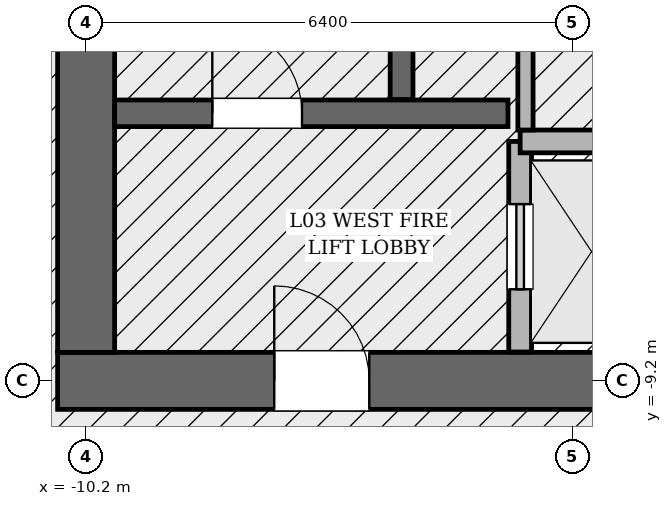
"""IFC4 building model, lengths in metres.
Left out: names, types, materials, properties, quantities, classifications, styles, units other than length and angle.
Written with IfcOpenShell. Run it as: python <this file> out.ifc"""

import sys

from ifc_helpers import new_model, si_unit, direction, frame, frame_2d, origin, place, context, subcontext, project, spatial, rectangle, extrude, element, fill, save


model = new_model("IFC4")
c1 = context("Model", 3, precision=1e-05, world=origin(), true_north=direction((0.0, 1.0)))
c2 = subcontext(c1, "Body", "Model", "MODEL_VIEW")
j1 = project(units=[si_unit("LENGTHUNIT", "METRE"), si_unit("PLANEANGLEUNIT", "RADIAN")], contexts=[c1])
p1 = place(None, origin())
s1 = spatial("IfcSite", under=j1, at=p1, CompositionType="ELEMENT")
p2 = place(p1, origin())
s2 = spatial("IfcBuilding", under=s1, at=p2, CompositionType="ELEMENT")
p3 = place(p2, frame((0.0, 0.0, 16.8)))
s3 = spatial("IfcBuildingStorey", under=s2, at=p3, CompositionType="ELEMENT", Elevation=16.8)
p4 = place(p3, frame((10.575, -9.2, 0.0), z_axis=(0.0, 0.0, 1.0), x_axis=(-1.0, 0.0, 0.0)))
e1 = element("IfcWall", 1, at=p4, inside=s3, PredefinedType="SHEAR", context=c2, shape_type="SweptSolid", body=[
    extrude(rectangle(XDim=21.15, YDim=0.75, at=frame_2d((10.575, 0.0))), origin(), (0.0, 0.0, 1.0), 5.4),
])
p5 = place(p4, frame((2.85, 0.0, 0.0)))
e2 = element("IfcOpeningElement", 2, at=p5, cuts=e1, PredefinedType="OPENING", context=c2, shape_type="SweptSolid", body=[
    extrude(rectangle(XDim=1.25, YDim=2.25, at=frame_2d((0.625, 1.125))), frame((0.0, 0.385, 0.0), z_axis=(0.0, -1.0, 0.0), x_axis=(1.0, 0.0, 0.0)), (0.0, 0.0, 1.0), 0.77),
])
p6 = place(p4, frame((17.05, 0.0, 0.0)))
e3 = element("IfcOpeningElement", 3, at=p6, cuts=e1, PredefinedType="OPENING", context=c2, shape_type="SweptSolid", body=[
    extrude(rectangle(XDim=1.25, YDim=2.25, at=frame_2d((0.625, 1.125))), frame((0.0, 0.385, 0.0), z_axis=(0.0, -1.0, 0.0), x_axis=(1.0, 0.0, 0.0)), (0.0, 0.0, 1.0), 0.77),
])
p7 = place(p3, frame((-10.2, -8.825, 0.0), z_axis=(0.0, 0.0, 1.0), x_axis=(0.0, 1.0, 0.0)))
e4 = element("IfcWall", 4, at=p7, inside=s3, PredefinedType="SHEAR", context=c2, shape_type="SweptSolid", body=[
    extrude(rectangle(XDim=17.65, YDim=0.75, at=frame_2d((8.825, 0.0))), origin(), (0.0, 0.0, 1.0), 5.4),
])
p8 = place(p7, frame((12.615, 0.0, 0.0)))
e5 = element("IfcOpeningElement", 5, at=p8, cuts=e4, PredefinedType="OPENING", context=c2, shape_type="SweptSolid", body=[
    extrude(rectangle(XDim=1.18, YDim=2.2, at=frame_2d((0.59, 1.1))), frame((0.0, 0.385, 0.0), z_axis=(0.0, -1.0, 0.0), x_axis=(1.0, 0.0, 0.0)), (0.0, 0.0, 1.0), 0.77),
])
p9 = place(p3, frame((-6.05, -5.5, 0.0), z_axis=(0.0, 0.0, 1.0), x_axis=(0.0, 1.0, 0.0)))
e6 = element("IfcWall", 6, at=p9, inside=s3, PredefinedType="SOLIDWALL", context=c2, shape_type="SweptSolid", body=[
    extrude(rectangle(XDim=8.95, YDim=0.3, at=frame_2d((4.475, 0.0))), origin(), (0.0, 0.0, 1.0), 5.4),
])
p10 = place(p3, frame((-9.825, -5.68, 0.0), z_axis=(0.0, 0.0, 1.0), x_axis=(1.0, 0.0, 0.0)))
e7 = element("IfcWall", 7, at=p10, inside=s3, PredefinedType="SOLIDWALL", context=c2, shape_type="SweptSolid", body=[
    extrude(rectangle(XDim=5.175, YDim=0.35, at=frame_2d((2.587, 0.0))), origin(), (0.0, 0.0, 1.0), 5.4),
])
p11 = place(p10, frame((1.285, 0.0, 0.0)))
e8 = element("IfcOpeningElement", 8, at=p11, cuts=e7, PredefinedType="OPENING", context=c2, shape_type="SweptSolid", body=[
    extrude(rectangle(XDim=1.18, YDim=2.2, at=frame_2d((0.59, 1.1))), frame((0.0, 0.185, 0.0), z_axis=(0.0, -1.0, 0.0), x_axis=(1.0, 0.0, 0.0)), (0.0, 0.0, 1.0), 0.37),
])
p12 = place(p3, frame((-4.49, -8.82, 0.0), z_axis=(0.0, 0.0, 1.0), x_axis=(0.0, 1.0, 0.0)))
e9 = element("IfcWall", 9, at=p12, inside=s3, PredefinedType="SOLIDWALL", context=c2, shape_type="SweptSolid", body=[
    extrude(rectangle(XDim=2.77, YDim=0.3, at=frame_2d((1.385, 0.0))), origin(), (0.0, 0.0, 1.0), 5.02),
])
p13 = place(p12, frame((0.825, 0.0, 0.0)))
e10 = element("IfcOpeningElement", 10, at=p13, cuts=e9, PredefinedType="OPENING", context=c2, shape_type="SweptSolid", body=[
    extrude(rectangle(XDim=1.12, YDim=2.25, at=frame_2d((0.56, 1.125))), frame((0.0, 0.16, 0.0), z_axis=(0.0, -1.0, 0.0), x_axis=(1.0, 0.0, 0.0)), (0.0, 0.0, 1.0), 0.32),
])
p14 = place(p3, frame((-4.49, -6.05, 0.0), z_axis=(0.0, 0.0, 1.0), x_axis=(1.0, 0.0, 0.0)))
e11 = element("IfcWall", 11, at=p14, inside=s3, PredefinedType="SOLIDWALL", context=c2, shape_type="SweptSolid", body=[
    extrude(rectangle(XDim=1.88, YDim=0.3, at=frame_2d((0.94, 0.0))), origin(), (0.0, 0.0, 1.0), 5.02),
])
p15 = place(p3, frame((-4.42, -4.16, 0.0), z_axis=(0.0, 0.0, 1.0), x_axis=(0.0, -1.0, 0.0)))
e12 = element("IfcWall", 12, at=p15, inside=s3, PredefinedType="SOLIDWALL", context=c2, shape_type="SweptSolid", body=[
    extrude(rectangle(XDim=1.74, YDim=0.2, at=frame_2d((0.87, 0.0))), origin(), (0.0, 0.0, 1.0), 5.02),
])
p16 = place(p11, origin())
e13 = element("IfcDoor", 13, at=p16, inside=s3, OperationType="SINGLE_SWING_LEFT", PredefinedType="DOOR", context=c2, shape_type="SweptSolid", body=[
    extrude(rectangle(XDim=1.18, YDim=2.2, at=frame_2d((0.59, 1.1))), frame((0.0, 0.025, 0.0), z_axis=(0.0, -1.0, 0.0), x_axis=(1.0, 0.0, 0.0)), (0.0, 0.0, 1.0), 0.05),
])
fill(e8, e13)
p17 = place(p6, origin())
e14 = element("IfcDoor", 14, at=p17, inside=s3, OperationType="SINGLE_SWING_RIGHT", PredefinedType="DOOR", context=c2, shape_type="SweptSolid", body=[
    extrude(rectangle(XDim=1.25, YDim=2.25, at=frame_2d((0.625, 1.125))), frame((0.0, 0.025, 0.0), z_axis=(0.0, -1.0, 0.0), x_axis=(1.0, 0.0, 0.0)), (0.0, 0.0, 1.0), 0.05),
])
fill(e3, e14)
p18 = place(p13, origin())
e15 = element("IfcDoor", 15, at=p18, inside=s3, OperationType="SLIDING_TO_LEFT", PredefinedType="DOOR", context=c2, shape_type="SweptSolid", body=[
    extrude(rectangle(XDim=1.12, YDim=2.25, at=frame_2d((0.56, 1.125))), frame((0.0, 0.025, 0.0), z_axis=(0.0, -1.0, 0.0), x_axis=(1.0, 0.0, 0.0)), (0.0, 0.0, 1.0), 0.05),
])
fill(e10, e15)
save(model, sys.argv[1])
